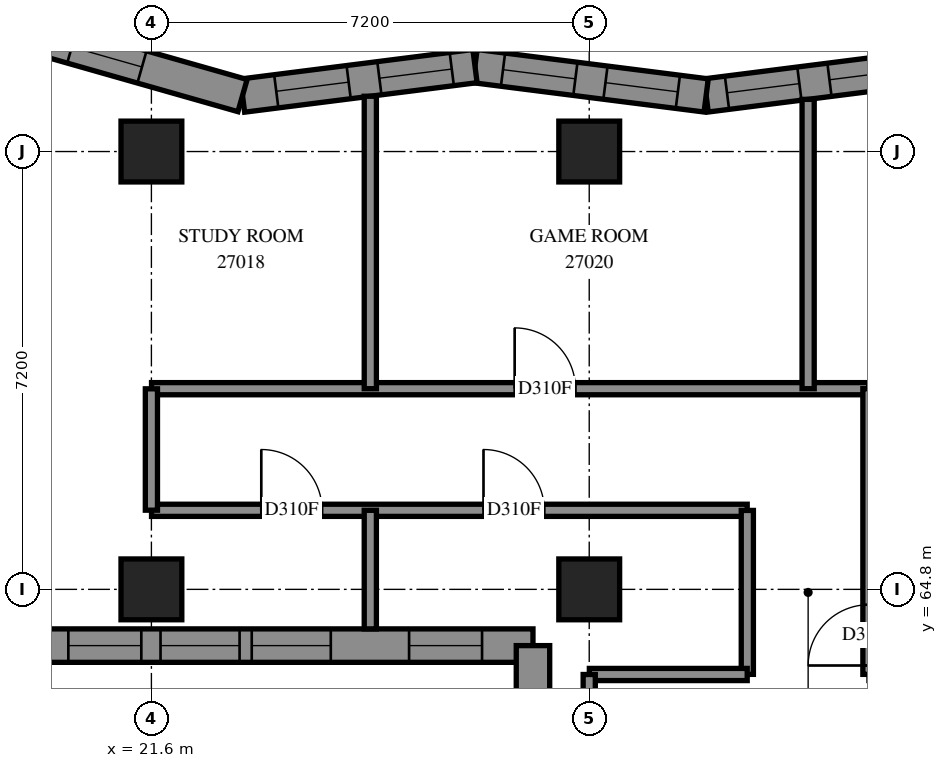
"""IFC4 building model, lengths in metres.
Left out: names, types, materials, properties, quantities, classifications, styles, units other than length and angle.
Written with IfcOpenShell. Run it as: python <this file> out.ifc"""

import sys

from ifc_helpers import new_model, si_unit, direction, frame, frame_2d, origin, origin_2d, place, context, subcontext, project, spatial, polyline, rectangle, outline, extrude, element, fill, save


model = new_model("IFC4")
c1 = context("Model", 3, precision=1e-05, world=origin(), true_north=direction((0.0, 1.0)))
c2 = subcontext(c1, "Body", "Model", "MODEL_VIEW")
j1 = project(units=[si_unit("LENGTHUNIT", "METRE"), si_unit("PLANEANGLEUNIT", "RADIAN")], contexts=[c1])
p1 = place(None, origin())
s1 = spatial("IfcSite", under=j1, at=p1, CompositionType="ELEMENT")
p2 = place(p1, origin())
s2 = spatial("IfcBuilding", under=s1, at=p2, CompositionType="ELEMENT")
p3 = place(p2, frame((0.0, 0.0, 101.6)))
s3 = spatial("IfcBuildingStorey", under=s2, at=p3, CompositionType="ELEMENT", Elevation=101.6)
for number, where, z_axis, x_axis in (
    (1, (21.6, 64.8, 0.0), (0.0, 0.0, 1.0), (1.0, 0.0, 0.0)),
    (2, (21.6, 72.0, 0.0), (0.0, 0.0, 1.0), (1.0, 0.0, 0.0)),
    (3, (28.8, 64.8, 0.0), (0.0, 0.0, 1.0), (1.0, 0.0, 0.0)),
    (4, (28.8, 72.0, 0.0), (0.0, 0.0, 1.0), (1.0, 0.0, 0.0)),
):
    element("IfcColumn", number, at=place(p3, frame(where, z_axis=z_axis, x_axis=x_axis)), inside=s3, PredefinedType="COLUMN", context=c2, shape_type="SweptSolid", body=[
        extrude(rectangle(XDim=1.0, YDim=1.0, at=origin_2d()), origin(), (0.0, 0.0, 1.0), 3.1),
    ])
p4 = place(p3, frame((34.525, 73.405, 0.0), z_axis=(0.0, 0.0, 1.0), x_axis=(-0.9920583495, -0.1257785003, 0.0)))
e5 = element("IfcWall", 5, at=p4, inside=s3, PredefinedType="SOLIDWALL", context=c2, shape_type="SweptSolid", body=[
    extrude(outline(polyline([(-0.035, -0.275), (3.797, -0.275), (3.867, 0.275), (0.035, 0.275), (-0.035, -0.275)])), origin(), (0.0, 0.0, 1.0), 3.1),
])
p5 = place(p4, frame((0.588, 0.0, 0.5)))
e6 = element("IfcOpeningElement", 6, at=p5, cuts=e5, PredefinedType="OPENING", context=c2, shape_type="SweptSolid", body=[
    extrude(rectangle(XDim=1.2, YDim=2.45, at=frame_2d((0.6, 1.225))), frame((0.0, 0.285, 0.0), z_axis=(0.0, -1.0, 0.0), x_axis=(1.0, 0.0, 0.0)), (0.0, 0.0, 1.0), 0.57),
])
p6 = place(p4, frame((2.287, 0.0, 0.5)))
e7 = element("IfcOpeningElement", 7, at=p6, cuts=e5, PredefinedType="OPENING", context=c2, shape_type="SweptSolid", body=[
    extrude(rectangle(XDim=1.2, YDim=2.45, at=frame_2d((0.6, 1.225))), frame((0.0, 0.285, 0.0), z_axis=(0.0, -1.0, 0.0), x_axis=(1.0, 0.0, 0.0)), (0.0, 0.0, 1.0), 0.57),
])
p7 = place(p3, frame((30.723, 72.923, 0.0), z_axis=(0.0, 0.0, 1.0), x_axis=(-0.9920583495, 0.1257785003, 0.0)))
e8 = element("IfcWall", 8, at=p7, inside=s3, PredefinedType="SOLIDWALL", context=c2, shape_type="SweptSolid", body=[
    extrude(outline(polyline([(0.035, -0.275), (3.867, -0.275), (3.797, 0.275), (-0.035, 0.275), (0.035, -0.275)])), origin(), (0.0, 0.0, 1.0), 3.1),
])
p8 = place(p7, frame((0.469, 0.0, 0.5)))
e9 = element("IfcOpeningElement", 9, at=p8, cuts=e8, PredefinedType="OPENING", context=c2, shape_type="SweptSolid", body=[
    extrude(rectangle(XDim=1.2, YDim=2.45, at=frame_2d((0.6, 1.225))), frame((0.0, 0.285, 0.0), z_axis=(0.0, -1.0, 0.0), x_axis=(1.0, 0.0, 0.0)), (0.0, 0.0, 1.0), 0.57),
])
p9 = place(p7, frame((2.168, 0.0, 0.5)))
e10 = element("IfcOpeningElement", 10, at=p9, cuts=e8, PredefinedType="OPENING", context=c2, shape_type="SweptSolid", body=[
    extrude(rectangle(XDim=1.2, YDim=2.45, at=frame_2d((0.6, 1.225))), frame((0.0, 0.285, 0.0), z_axis=(0.0, -1.0, 0.0), x_axis=(1.0, 0.0, 0.0)), (0.0, 0.0, 1.0), 0.57),
])
p10 = place(p3, frame((26.921, 73.405, 0.0), z_axis=(0.0, 0.0, 1.0), x_axis=(-0.9920579561, -0.1257816033, 0.0)))
e11 = element("IfcWall", 11, at=p10, inside=s3, PredefinedType="SOLIDWALL", context=c2, shape_type="SweptSolid", body=[
    extrude(outline(polyline([(-0.035, -0.275), (3.797, -0.275), (3.91, 0.275), (0.035, 0.275), (-0.035, -0.275)])), origin(), (0.0, 0.0, 1.0), 3.1),
])
p11 = place(p10, frame((0.385, 0.0, 0.5)))
e12 = element("IfcOpeningElement", 12, at=p11, cuts=e11, PredefinedType="OPENING", context=c2, shape_type="SweptSolid", body=[
    extrude(rectangle(XDim=1.2, YDim=2.45, at=frame_2d((0.6, 1.225))), frame((0.0, 0.285, 0.0), z_axis=(0.0, -1.0, 0.0), x_axis=(1.0, 0.0, 0.0)), (0.0, 0.0, 1.0), 0.57),
])
p12 = place(p10, frame((2.094, 0.0, 0.5)))
e13 = element("IfcOpeningElement", 13, at=p12, cuts=e11, PredefinedType="OPENING", context=c2, shape_type="SweptSolid", body=[
    extrude(rectangle(XDim=1.2, YDim=2.45, at=frame_2d((0.6, 1.225))), frame((0.0, 0.285, 0.0), z_axis=(0.0, -1.0, 0.0), x_axis=(1.0, 0.0, 0.0)), (0.0, 0.0, 1.0), 0.57),
])
p13 = place(p3, frame((23.099, 72.92, 0.0), z_axis=(0.0, 0.0, 1.0), x_axis=(-0.9618040283, 0.2737389471, 0.0)))
e14 = element("IfcWall", 14, at=p13, inside=s3, PredefinedType="SOLIDWALL", context=c2, shape_type="SweptSolid", body=[
    extrude(outline(polyline([(0.056, -0.275), (4.009, -0.275), (3.28, 0.275), (-0.056, 0.275), (0.056, -0.275)])), origin(), (0.0, 0.0, 1.0), 3.1),
])
p14 = place(p13, frame((1.719, 0.0, 0.5)))
e15 = element("IfcOpeningElement", 15, at=p14, cuts=e14, PredefinedType="OPENING", context=c2, shape_type="SweptSolid", body=[
    extrude(rectangle(XDim=1.2, YDim=2.45, at=frame_2d((0.6, 1.225))), frame((0.0, 0.285, 0.0), z_axis=(0.0, -1.0, 0.0), x_axis=(1.0, 0.0, 0.0)), (0.0, 0.0, 1.0), 0.57),
])
p15 = place(p3, frame((19.593, 63.875, 0.0), z_axis=(0.0, 0.0, 1.0), x_axis=(1.0, 0.0, 0.0)))
e16 = element("IfcWall", 16, at=p15, inside=s3, PredefinedType="SOLIDWALL", context=c2, shape_type="SweptSolid", body=[
    extrude(outline(polyline([(-0.275, -0.275), (8.007, -0.275), (8.557, 0.275), (0.275, 0.275), (-0.275, -0.275)])), origin(), (0.0, 0.0, 1.0), 3.1),
])
p16 = place(p15, frame((2.157, 0.0, 0.5)))
e17 = element("IfcOpeningElement", 17, at=p16, cuts=e16, PredefinedType="OPENING", context=c2, shape_type="SweptSolid", body=[
    extrude(rectangle(XDim=1.3, YDim=2.45, at=frame_2d((0.65, 1.225))), frame((0.0, 0.285, 0.0), z_axis=(0.0, -1.0, 0.0), x_axis=(1.0, 0.0, 0.0)), (0.0, 0.0, 1.0), 0.57),
])
p17 = place(p15, frame((3.657, 0.0, 0.5)))
e18 = element("IfcOpeningElement", 18, at=p17, cuts=e16, PredefinedType="OPENING", context=c2, shape_type="SweptSolid", body=[
    extrude(rectangle(XDim=1.3, YDim=2.45, at=frame_2d((0.65, 1.225))), frame((0.0, 0.285, 0.0), z_axis=(0.0, -1.0, 0.0), x_axis=(1.0, 0.0, 0.0)), (0.0, 0.0, 1.0), 0.57),
])
p18 = place(p15, frame((0.641, 0.0, 0.5)))
e19 = element("IfcOpeningElement", 19, at=p18, cuts=e16, PredefinedType="OPENING", context=c2, shape_type="SweptSolid", body=[
    extrude(rectangle(XDim=1.2, YDim=2.45, at=frame_2d((0.6, 1.225))), frame((0.0, 0.285, 0.0), z_axis=(0.0, -1.0, 0.0), x_axis=(1.0, 0.0, 0.0)), (0.0, 0.0, 1.0), 0.57),
])
p19 = place(p15, frame((6.245, 0.0, 0.5)))
e20 = element("IfcOpeningElement", 20, at=p19, cuts=e16, PredefinedType="OPENING", context=c2, shape_type="SweptSolid", body=[
    extrude(rectangle(XDim=1.2, YDim=2.45, at=frame_2d((0.6, 1.225))), frame((0.0, 0.285, 0.0), z_axis=(0.0, -1.0, 0.0), x_axis=(1.0, 0.0, 0.0)), (0.0, 0.0, 1.0), 0.57),
])
p20 = place(p3, frame((27.875, 63.875, 0.0), z_axis=(0.0, 0.0, 1.0), x_axis=(0.0, -1.0, 0.0)))
e21 = element("IfcWall", 21, at=p20, inside=s3, PredefinedType="SOLIDWALL", context=c2, shape_type="SweptSolid", body=[
    extrude(outline(polyline([(0.275, -0.275), (8.557, -0.275), (8.007, 0.275), (-0.275, 0.275), (0.275, -0.275)])), origin(), (0.0, 0.0, 1.0), 3.1),
])
p21 = place(p20, frame((3.325, 0.0, 0.5)))
e22 = element("IfcOpeningElement", 22, at=p21, cuts=e21, PredefinedType="OPENING", context=c2, shape_type="SweptSolid", body=[
    extrude(rectangle(XDim=1.3, YDim=2.45, at=frame_2d((0.65, 1.225))), frame((0.0, 0.285, 0.0), z_axis=(0.0, -1.0, 0.0), x_axis=(1.0, 0.0, 0.0)), (0.0, 0.0, 1.0), 0.57),
])
p22 = place(p20, frame((4.975, 0.0, 0.5)))
e23 = element("IfcOpeningElement", 23, at=p22, cuts=e21, PredefinedType="OPENING", context=c2, shape_type="SweptSolid", body=[
    extrude(rectangle(XDim=1.3, YDim=2.45, at=frame_2d((0.65, 1.225))), frame((0.0, 0.285, 0.0), z_axis=(0.0, -1.0, 0.0), x_axis=(1.0, 0.0, 0.0)), (0.0, 0.0, 1.0), 0.57),
])
p23 = place(p20, frame((0.838, 0.0, 0.5)))
e24 = element("IfcOpeningElement", 24, at=p23, cuts=e21, PredefinedType="OPENING", context=c2, shape_type="SweptSolid", body=[
    extrude(rectangle(XDim=1.2, YDim=2.45, at=frame_2d((0.6, 1.225))), frame((0.0, 0.285, 0.0), z_axis=(0.0, -1.0, 0.0), x_axis=(1.0, 0.0, 0.0)), (0.0, 0.0, 1.0), 0.57),
])
p24 = place(p20, frame((6.441, 0.0, 0.5)))
e25 = element("IfcOpeningElement", 25, at=p24, cuts=e21, PredefinedType="OPENING", context=c2, shape_type="SweptSolid", body=[
    extrude(rectangle(XDim=1.2, YDim=2.45, at=frame_2d((0.6, 1.225))), frame((0.0, 0.285, 0.0), z_axis=(0.0, -1.0, 0.0), x_axis=(1.0, 0.0, 0.0)), (0.0, 0.0, 1.0), 0.57),
])
p25 = place(p3, frame((21.602, 68.1, 0.0), z_axis=(0.0, 0.0, 1.0), x_axis=(1.0, 0.0, 0.0)))
e26 = element("IfcWall", 26, at=p25, inside=s3, PredefinedType="PARTITIONING", context=c2, shape_type="SweptSolid", body=[
    extrude(rectangle(XDim=11.798, YDim=0.2, at=frame_2d((5.899, 0.0))), origin(), (0.0, 0.0, 1.0), 3.1),
])
p26 = place(p25, frame((5.972, 0.0, 0.0)))
e27 = element("IfcOpeningElement", 27, at=p26, cuts=e26, PredefinedType="OPENING", context=c2, shape_type="SweptSolid", body=[
    extrude(rectangle(XDim=1.0, YDim=2.1, at=frame_2d((0.5, 1.05))), frame((0.0, 0.11, 0.0), z_axis=(0.0, -1.0, 0.0), x_axis=(1.0, 0.0, 0.0)), (0.0, 0.0, 1.0), 0.22),
])
p27 = place(p3, frame((21.602, 66.1, 0.0), z_axis=(0.0, 0.0, 1.0), x_axis=(1.0, 0.0, 0.0)))
e28 = element("IfcWall", 28, at=p27, inside=s3, PredefinedType="PARTITIONING", context=c2, shape_type="SweptSolid", body=[
    extrude(rectangle(XDim=9.796, YDim=0.2, at=frame_2d((4.898, 0.0))), origin(), (0.0, 0.0, 1.0), 3.1),
])
p28 = place(p27, frame((1.805, 0.0, 0.0)))
e29 = element("IfcOpeningElement", 29, at=p28, cuts=e28, PredefinedType="OPENING", context=c2, shape_type="SweptSolid", body=[
    extrude(rectangle(XDim=1.0, YDim=2.1, at=frame_2d((0.5, 1.05))), frame((0.0, 0.11, 0.0), z_axis=(0.0, -1.0, 0.0), x_axis=(1.0, 0.0, 0.0)), (0.0, 0.0, 1.0), 0.22),
])
p29 = place(p27, frame((5.459, 0.0, 0.0)))
e30 = element("IfcOpeningElement", 30, at=p29, cuts=e28, PredefinedType="OPENING", context=c2, shape_type="SweptSolid", body=[
    extrude(rectangle(XDim=1.0, YDim=2.1, at=frame_2d((0.5, 1.05))), frame((0.0, 0.11, 0.0), z_axis=(0.0, -1.0, 0.0), x_axis=(1.0, 0.0, 0.0)), (0.0, 0.0, 1.0), 0.22),
])
p30 = place(p3, frame((25.2, 68.1, 0.0), z_axis=(0.0, 0.0, 1.0), x_axis=(0.0, 1.0, 0.0)))
e31 = element("IfcWall", 31, at=p30, inside=s3, PredefinedType="PARTITIONING", context=c2, shape_type="SweptSolid", body=[
    extrude(rectangle(XDim=4.809, YDim=0.2, at=frame_2d((2.405, 0.0))), origin(), (0.0, 0.0, 1.0), 3.1),
])
p31 = place(p3, frame((32.4, 68.1, 0.0), z_axis=(0.0, 0.0, 1.0), x_axis=(0.0, 1.0, 0.0)))
e32 = element("IfcWall", 32, at=p31, inside=s3, PredefinedType="PARTITIONING", context=c2, shape_type="SweptSolid", body=[
    extrude(rectangle(XDim=4.758, YDim=0.2, at=frame_2d((2.379, 0.0))), origin(), (0.0, 0.0, 1.0), 3.1),
])
p32 = place(p3, frame((33.4, 63.402, 0.0), z_axis=(0.0, 0.0, 1.0), x_axis=(0.0, 1.0, 0.0)))
e33 = element("IfcWall", 33, at=p32, inside=s3, PredefinedType="PARTITIONING", context=c2, shape_type="SweptSolid", body=[
    extrude(rectangle(XDim=4.698, YDim=0.2, at=frame_2d((2.349, 0.0))), origin(), (0.0, 0.0, 1.0), 3.1),
])
p33 = place(p32, frame((0.146, 0.0, 0.0)))
e34 = element("IfcOpeningElement", 34, at=p33, cuts=e33, PredefinedType="OPENING", context=c2, shape_type="SweptSolid", body=[
    extrude(rectangle(XDim=1.0, YDim=2.1, at=frame_2d((0.5, 1.05))), frame((0.0, 0.11, 0.0), z_axis=(0.0, -1.0, 0.0), x_axis=(1.0, 0.0, 0.0)), (0.0, 0.0, 1.0), 0.22),
])
p34 = place(p3, frame((31.4, 63.402, 0.0), z_axis=(0.0, 0.0, 1.0), x_axis=(0.0, 1.0, 0.0)))
e35 = element("IfcWall", 35, at=p34, inside=s3, PredefinedType="PARTITIONING", context=c2, shape_type="SweptSolid", body=[
    extrude(rectangle(XDim=2.696, YDim=0.2, at=frame_2d((1.348, 0.0))), origin(), (0.0, 0.0, 1.0), 3.1),
])
p35 = place(p3, frame((28.802, 63.4, 0.0), z_axis=(0.0, 0.0, 1.0), x_axis=(1.0, 0.0, 0.0)))
e36 = element("IfcWall", 36, at=p35, inside=s3, PredefinedType="PARTITIONING", context=c2, shape_type="SweptSolid", body=[
    extrude(rectangle(XDim=2.596, YDim=0.2, at=frame_2d((1.298, 0.0))), origin(), (0.0, 0.0, 1.0), 3.1),
])
p36 = place(p3, frame((28.8, 61.4, 0.0), z_axis=(0.0, 0.0, 1.0), x_axis=(0.0, 1.0, 0.0)))
e37 = element("IfcWall", 37, at=p36, inside=s3, PredefinedType="PARTITIONING", context=c2, shape_type="SweptSolid", body=[
    extrude(rectangle(XDim=2.0, YDim=0.2, at=frame_2d((1.0, 0.0))), origin(), (0.0, 0.0, 1.0), 2.6),
])
p37 = place(p3, frame((21.6, 66.102, 0.0), z_axis=(0.0, 0.0, 1.0), x_axis=(0.0, 1.0, 0.0)))
e38 = element("IfcWall", 38, at=p37, inside=s3, PredefinedType="PARTITIONING", context=c2, shape_type="SweptSolid", body=[
    extrude(rectangle(XDim=1.996, YDim=0.2, at=frame_2d((0.998, 0.0))), origin(), (0.0, 0.0, 1.0), 2.6),
])
p38 = place(p3, frame((25.2, 64.15, 0.0), z_axis=(0.0, 0.0, 1.0), x_axis=(0.0, 1.0, 0.0)))
e39 = element("IfcWall", 39, at=p38, inside=s3, PredefinedType="PARTITIONING", context=c2, shape_type="SweptSolid", body=[
    extrude(rectangle(XDim=1.95, YDim=0.2, at=frame_2d((0.975, 0.0))), origin(), (0.0, 0.0, 1.0), 3.1),
])
p39 = place(p5, origin())
e40 = element("IfcWindow", 40, at=p39, inside=s3, PartitioningType="SINGLE_PANEL", PredefinedType="WINDOW", context=c2, shape_type="SweptSolid", body=[
    extrude(rectangle(XDim=1.2, YDim=2.45, at=frame_2d((0.6, 1.225))), frame((0.0, 0.155, 0.0), z_axis=(0.0, -1.0, 0.0), x_axis=(1.0, 0.0, 0.0)), (0.0, 0.0, 1.0), 0.06),
])
fill(e6, e40)
p40 = place(p6, origin())
e41 = element("IfcWindow", 41, at=p40, inside=s3, PartitioningType="SINGLE_PANEL", PredefinedType="WINDOW", context=c2, shape_type="SweptSolid", body=[
    extrude(rectangle(XDim=1.2, YDim=2.45, at=frame_2d((0.6, 1.225))), frame((0.0, 0.155, 0.0), z_axis=(0.0, -1.0, 0.0), x_axis=(1.0, 0.0, 0.0)), (0.0, 0.0, 1.0), 0.06),
])
fill(e7, e41)
p41 = place(p8, origin())
e42 = element("IfcWindow", 42, at=p41, inside=s3, PartitioningType="SINGLE_PANEL", PredefinedType="WINDOW", context=c2, shape_type="SweptSolid", body=[
    extrude(rectangle(XDim=1.2, YDim=2.45, at=frame_2d((0.6, 1.225))), frame((0.0, 0.155, 0.0), z_axis=(0.0, -1.0, 0.0), x_axis=(1.0, 0.0, 0.0)), (0.0, 0.0, 1.0), 0.06),
])
fill(e9, e42)
p42 = place(p9, origin())
e43 = element("IfcWindow", 43, at=p42, inside=s3, PartitioningType="SINGLE_PANEL", PredefinedType="WINDOW", context=c2, shape_type="SweptSolid", body=[
    extrude(rectangle(XDim=1.2, YDim=2.45, at=frame_2d((0.6, 1.225))), frame((0.0, 0.155, 0.0), z_axis=(0.0, -1.0, 0.0), x_axis=(1.0, 0.0, 0.0)), (0.0, 0.0, 1.0), 0.06),
])
fill(e10, e43)
p43 = place(p11, origin())
e44 = element("IfcWindow", 44, at=p43, inside=s3, PartitioningType="SINGLE_PANEL", PredefinedType="WINDOW", context=c2, shape_type="SweptSolid", body=[
    extrude(rectangle(XDim=1.2, YDim=2.45, at=frame_2d((0.6, 1.225))), frame((0.0, 0.155, 0.0), z_axis=(0.0, -1.0, 0.0), x_axis=(1.0, 0.0, 0.0)), (0.0, 0.0, 1.0), 0.06),
])
fill(e12, e44)
p44 = place(p12, origin())
e45 = element("IfcWindow", 45, at=p44, inside=s3, PartitioningType="SINGLE_PANEL", PredefinedType="WINDOW", context=c2, shape_type="SweptSolid", body=[
    extrude(rectangle(XDim=1.2, YDim=2.45, at=frame_2d((0.6, 1.225))), frame((0.0, 0.155, 0.0), z_axis=(0.0, -1.0, 0.0), x_axis=(1.0, 0.0, 0.0)), (0.0, 0.0, 1.0), 0.06),
])
fill(e13, e45)
p45 = place(p14, origin())
e46 = element("IfcWindow", 46, at=p45, inside=s3, PartitioningType="SINGLE_PANEL", PredefinedType="WINDOW", context=c2, shape_type="SweptSolid", body=[
    extrude(rectangle(XDim=1.2, YDim=2.45, at=frame_2d((0.6, 1.225))), frame((0.0, 0.155, 0.0), z_axis=(0.0, -1.0, 0.0), x_axis=(1.0, 0.0, 0.0)), (0.0, 0.0, 1.0), 0.06),
])
fill(e15, e46)
p46 = place(p16, origin())
e47 = element("IfcWindow", 47, at=p46, inside=s3, PartitioningType="SINGLE_PANEL", PredefinedType="WINDOW", context=c2, shape_type="SweptSolid", body=[
    extrude(rectangle(XDim=1.3, YDim=2.45, at=frame_2d((0.65, 1.225))), frame((0.0, 0.155, 0.0), z_axis=(0.0, -1.0, 0.0), x_axis=(1.0, 0.0, 0.0)), (0.0, 0.0, 1.0), 0.06),
])
fill(e17, e47)
p47 = place(p17, origin())
e48 = element("IfcWindow", 48, at=p47, inside=s3, PartitioningType="SINGLE_PANEL", PredefinedType="WINDOW", context=c2, shape_type="SweptSolid", body=[
    extrude(rectangle(XDim=1.3, YDim=2.45, at=frame_2d((0.65, 1.225))), frame((0.0, 0.155, 0.0), z_axis=(0.0, -1.0, 0.0), x_axis=(1.0, 0.0, 0.0)), (0.0, 0.0, 1.0), 0.06),
])
fill(e18, e48)
p48 = place(p18, origin())
e49 = element("IfcWindow", 49, at=p48, inside=s3, PartitioningType="SINGLE_PANEL", PredefinedType="WINDOW", context=c2, shape_type="SweptSolid", body=[
    extrude(rectangle(XDim=1.2, YDim=2.45, at=frame_2d((0.6, 1.225))), frame((0.0, 0.155, 0.0), z_axis=(0.0, -1.0, 0.0), x_axis=(1.0, 0.0, 0.0)), (0.0, 0.0, 1.0), 0.06),
])
fill(e19, e49)
p49 = place(p19, origin())
e50 = element("IfcWindow", 50, at=p49, inside=s3, PartitioningType="SINGLE_PANEL", PredefinedType="WINDOW", context=c2, shape_type="SweptSolid", body=[
    extrude(rectangle(XDim=1.2, YDim=2.45, at=frame_2d((0.6, 1.225))), frame((0.0, 0.155, 0.0), z_axis=(0.0, -1.0, 0.0), x_axis=(1.0, 0.0, 0.0)), (0.0, 0.0, 1.0), 0.06),
])
fill(e20, e50)
p50 = place(p28, origin())
e51 = element("IfcDoor", 51, at=p50, inside=s3, OperationType="SINGLE_SWING_RIGHT", PredefinedType="DOOR", context=c2, shape_type="SweptSolid", body=[
    extrude(rectangle(XDim=1.0, YDim=2.1, at=frame_2d((0.5, 1.05))), frame((0.0, 0.025, 0.0), z_axis=(0.0, -1.0, 0.0), x_axis=(1.0, 0.0, 0.0)), (0.0, 0.0, 1.0), 0.05),
])
fill(e29, e51)
p51 = place(p29, origin())
e52 = element("IfcDoor", 52, at=p51, inside=s3, OperationType="SINGLE_SWING_RIGHT", PredefinedType="DOOR", context=c2, shape_type="SweptSolid", body=[
    extrude(rectangle(XDim=1.0, YDim=2.1, at=frame_2d((0.5, 1.05))), frame((0.0, 0.025, 0.0), z_axis=(0.0, -1.0, 0.0), x_axis=(1.0, 0.0, 0.0)), (0.0, 0.0, 1.0), 0.05),
])
fill(e30, e52)
p52 = place(p26, origin())
e53 = element("IfcDoor", 53, at=p52, inside=s3, OperationType="SINGLE_SWING_LEFT", PredefinedType="DOOR", context=c2, shape_type="SweptSolid", body=[
    extrude(rectangle(XDim=1.0, YDim=2.1, at=frame_2d((0.5, 1.05))), frame((0.0, 0.025, 0.0), z_axis=(0.0, -1.0, 0.0), x_axis=(1.0, 0.0, 0.0)), (0.0, 0.0, 1.0), 0.05),
])
fill(e27, e53)
p53 = place(p33, origin())
e54 = element("IfcDoor", 54, at=p53, inside=s3, OperationType="SINGLE_SWING_LEFT", PredefinedType="DOOR", context=c2, shape_type="SweptSolid", body=[
    extrude(rectangle(XDim=1.0, YDim=2.1, at=frame_2d((0.5, 1.05))), frame((0.0, 0.025, 0.0), z_axis=(0.0, -1.0, 0.0), x_axis=(1.0, 0.0, 0.0)), (0.0, 0.0, 1.0), 0.05),
])
fill(e34, e54)
save(model, sys.argv[1])
